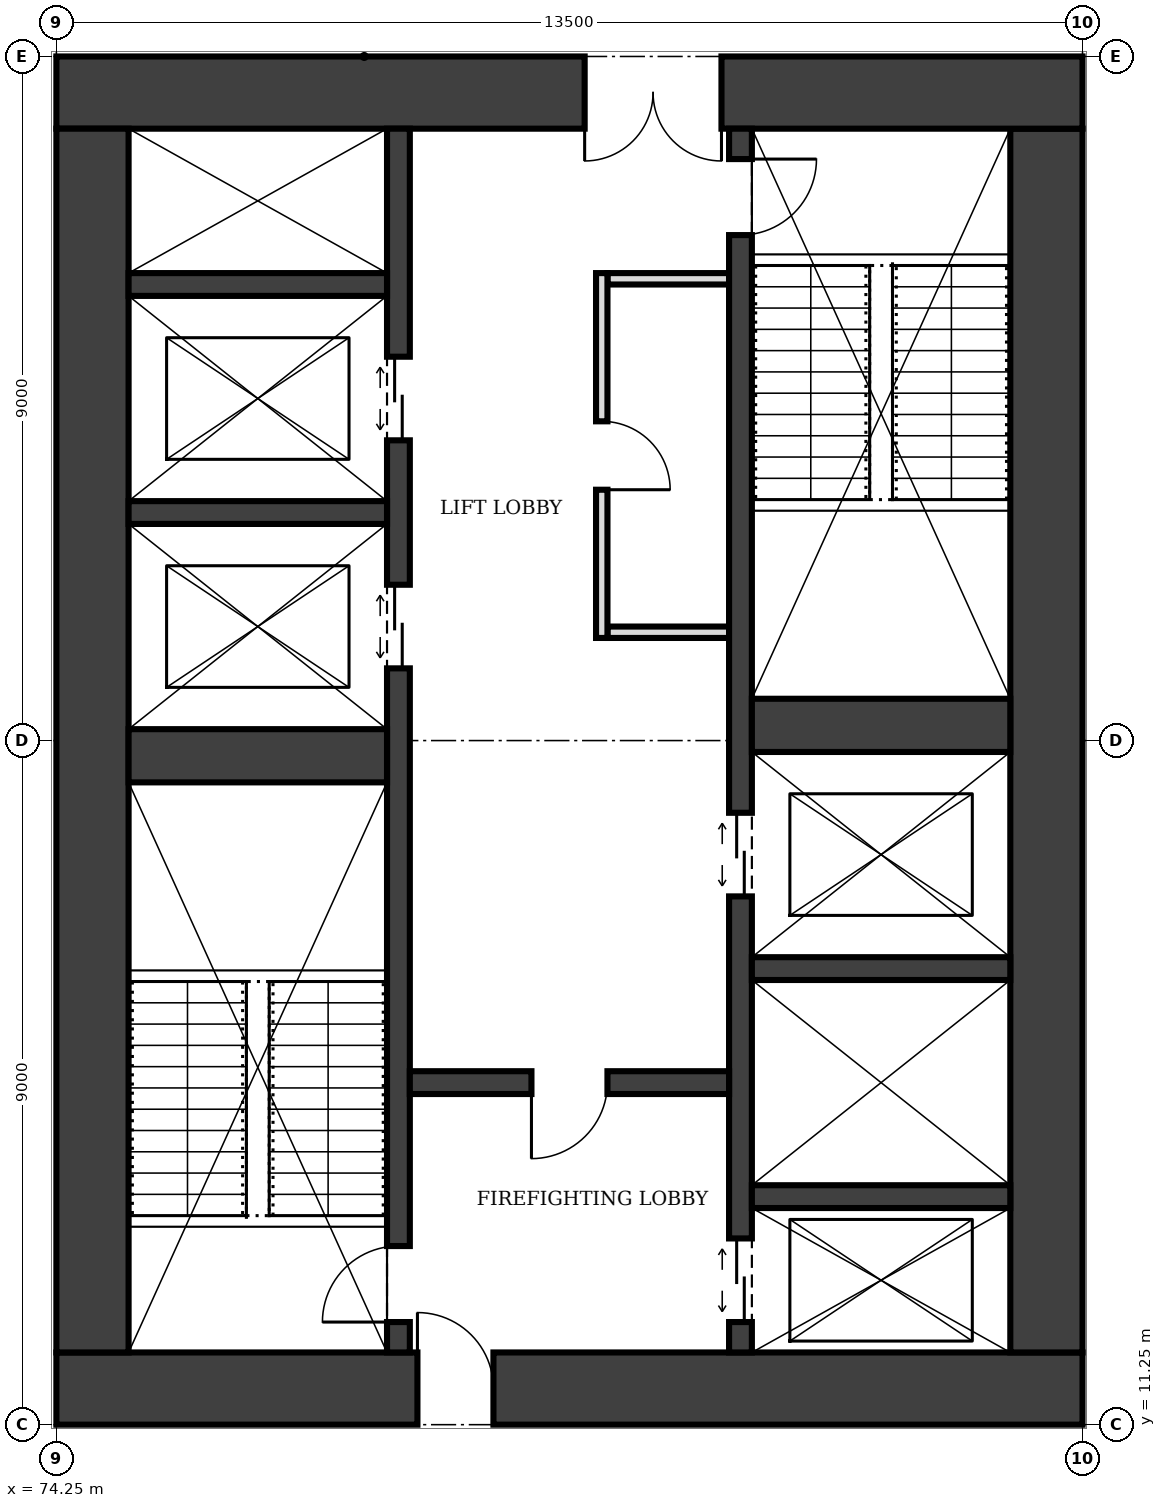
"""IFC4 building model, lengths in metres.
Left out: names, types, materials, properties, quantities, classifications, styles, units other than length and angle.
Written with IfcOpenShell. Run it as: python <this file> out.ifc"""

import sys

from ifc_helpers import new_model, si_unit, direction, frame, frame_2d, origin, place, context, subcontext, project, spatial, rectangle, extrude, element, fill, save


model = new_model("IFC4")
c1 = context("Model", 3, precision=1e-05, world=origin(), true_north=direction((0.0, 1.0)))
c2 = subcontext(c1, "Body", "Model", "MODEL_VIEW")
j1 = project(units=[si_unit("LENGTHUNIT", "METRE"), si_unit("PLANEANGLEUNIT", "RADIAN")], contexts=[c1])
p1 = place(None, origin())
s1 = spatial("IfcSite", under=j1, at=p1, CompositionType="ELEMENT")
p2 = place(p1, origin())
s2 = spatial("IfcBuilding", under=s1, at=p2, CompositionType="ELEMENT")
p3 = place(p2, frame((0.0, 0.0, 41.0)))
s3 = spatial("IfcBuildingStorey", under=s2, at=p3, CompositionType="ELEMENT", Elevation=41.0)
p4 = place(p3, frame((74.25, 11.725, 0.0), z_axis=(0.0, 0.0, 1.0), x_axis=(1.0, 0.0, 0.0)))
e1 = element("IfcWall", 1, at=p4, inside=s3, PredefinedType="SHEAR", context=c2, shape_type="SweptSolid", body=[
    extrude(rectangle(XDim=13.5, YDim=0.95, at=frame_2d((6.75, 0.0))), origin(), (0.0, 0.0, 1.0), 4.0),
])
p5 = place(p4, frame((4.75, 0.0, 0.0)))
e2 = element("IfcOpeningElement", 2, at=p5, cuts=e1, PredefinedType="OPENING", context=c2, shape_type="SweptSolid", body=[
    extrude(rectangle(XDim=1.0, YDim=2.1, at=frame_2d((0.5, 1.05))), frame((0.0, 0.485, 0.0), z_axis=(0.0, -1.0, 0.0), x_axis=(1.0, 0.0, 0.0)), (0.0, 0.0, 1.0), 0.97),
])
p6 = place(p3, frame((87.275, 12.2, 0.0), z_axis=(0.0, 0.0, 1.0), x_axis=(0.0, 1.0, 0.0)))
e3 = element("IfcWall", 3, at=p6, inside=s3, PredefinedType="SHEAR", context=c2, shape_type="SweptSolid", body=[
    extrude(rectangle(XDim=16.1, YDim=0.95, at=frame_2d((8.05, 0.0))), origin(), (0.0, 0.0, 1.0), 4.0),
])
p7 = place(p3, frame((87.75, 28.775, 0.0), z_axis=(0.0, 0.0, 1.0), x_axis=(-1.0, 0.0, 0.0)))
e4 = element("IfcWall", 4, at=p7, inside=s3, PredefinedType="SHEAR", context=c2, shape_type="SweptSolid", body=[
    extrude(rectangle(XDim=13.5, YDim=0.95, at=frame_2d((6.75, 0.0))), origin(), (0.0, 0.0, 1.0), 4.0),
])
p8 = place(p7, frame((4.75, 0.0, 0.0)))
e5 = element("IfcOpeningElement", 5, at=p8, cuts=e4, PredefinedType="OPENING", context=c2, shape_type="SweptSolid", body=[
    extrude(rectangle(XDim=1.8, YDim=2.1, at=frame_2d((0.9, 1.05))), frame((0.0, 0.485, 0.0), z_axis=(0.0, -1.0, 0.0), x_axis=(1.0, 0.0, 0.0)), (0.0, 0.0, 1.0), 0.97),
])
p9 = place(p3, frame((74.725, 28.3, 0.0), z_axis=(0.0, 0.0, 1.0), x_axis=(0.0, -1.0, 0.0)))
e6 = element("IfcWall", 6, at=p9, inside=s3, PredefinedType="SHEAR", context=c2, shape_type="SweptSolid", body=[
    extrude(rectangle(XDim=16.1, YDim=0.95, at=frame_2d((8.05, 0.0))), origin(), (0.0, 0.0, 1.0), 4.0),
])
p10 = place(p3, frame((78.75, 12.2, 0.0), z_axis=(0.0, 0.0, 1.0), x_axis=(0.0, 1.0, 0.0)))
e7 = element("IfcWall", 7, at=p10, inside=s3, PredefinedType="SHEAR", context=c2, shape_type="SweptSolid", body=[
    extrude(rectangle(XDim=16.1, YDim=0.3, at=frame_2d((8.05, 0.0))), origin(), (0.0, 0.0, 1.0), 4.0),
])
p11 = place(p10, frame((0.4, 0.0, 0.0)))
e8 = element("IfcOpeningElement", 8, at=p11, cuts=e7, PredefinedType="OPENING", context=c2, shape_type="SweptSolid", body=[
    extrude(rectangle(XDim=1.0, YDim=2.1, at=frame_2d((0.5, 1.05))), frame((0.0, 0.16, 0.0), z_axis=(0.0, -1.0, 0.0), x_axis=(1.0, 0.0, 0.0)), (0.0, 0.0, 1.0), 0.32),
])
p12 = place(p10, frame((9.0, 0.0, 0.0)))
e9 = element("IfcOpeningElement", 9, at=p12, cuts=e7, PredefinedType="OPENING", context=c2, shape_type="SweptSolid", body=[
    extrude(rectangle(XDim=1.1, YDim=2.1, at=frame_2d((0.55, 1.05))), frame((0.0, 0.16, 0.0), z_axis=(0.0, -1.0, 0.0), x_axis=(1.0, 0.0, 0.0)), (0.0, 0.0, 1.0), 0.32),
])
p13 = place(p10, frame((12.0, 0.0, 0.0)))
e10 = element("IfcOpeningElement", 10, at=p13, cuts=e7, PredefinedType="OPENING", context=c2, shape_type="SweptSolid", body=[
    extrude(rectangle(XDim=1.1, YDim=2.1, at=frame_2d((0.55, 1.05))), frame((0.0, 0.16, 0.0), z_axis=(0.0, -1.0, 0.0), x_axis=(1.0, 0.0, 0.0)), (0.0, 0.0, 1.0), 0.32),
])
p14 = place(p3, frame((83.25, 12.2, 0.0), z_axis=(0.0, 0.0, 1.0), x_axis=(0.0, 1.0, 0.0)))
e11 = element("IfcWall", 11, at=p14, inside=s3, PredefinedType="SHEAR", context=c2, shape_type="SweptSolid", body=[
    extrude(rectangle(XDim=16.1, YDim=0.3, at=frame_2d((8.05, 0.0))), origin(), (0.0, 0.0, 1.0), 4.0),
])
p15 = place(p14, frame((14.7, 0.0, 0.0)))
e12 = element("IfcOpeningElement", 12, at=p15, cuts=e11, PredefinedType="OPENING", context=c2, shape_type="SweptSolid", body=[
    extrude(rectangle(XDim=1.0, YDim=2.1, at=frame_2d((0.5, 1.05))), frame((0.0, 0.16, 0.0), z_axis=(0.0, -1.0, 0.0), x_axis=(1.0, 0.0, 0.0)), (0.0, 0.0, 1.0), 0.32),
])
p16 = place(p14, frame((0.4, 0.0, 0.0)))
e13 = element("IfcOpeningElement", 13, at=p16, cuts=e11, PredefinedType="OPENING", context=c2, shape_type="SweptSolid", body=[
    extrude(rectangle(XDim=1.1, YDim=2.1, at=frame_2d((0.55, 1.05))), frame((0.0, 0.16, 0.0), z_axis=(0.0, -1.0, 0.0), x_axis=(1.0, 0.0, 0.0)), (0.0, 0.0, 1.0), 0.32),
])
p17 = place(p14, frame((6.0, 0.0, 0.0)))
e14 = element("IfcOpeningElement", 14, at=p17, cuts=e11, PredefinedType="OPENING", context=c2, shape_type="SweptSolid", body=[
    extrude(rectangle(XDim=1.1, YDim=2.1, at=frame_2d((0.55, 1.05))), frame((0.0, 0.16, 0.0), z_axis=(0.0, -1.0, 0.0), x_axis=(1.0, 0.0, 0.0)), (0.0, 0.0, 1.0), 0.32),
])
p18 = place(p3, frame((75.2, 20.05, 0.0), z_axis=(0.0, 0.0, 1.0), x_axis=(1.0, 0.0, 0.0)))
e15 = element("IfcWall", 15, at=p18, inside=s3, PredefinedType="SHEAR", context=c2, shape_type="SweptSolid", body=[
    extrude(rectangle(XDim=3.4, YDim=0.7, at=frame_2d((1.7, 0.0))), origin(), (0.0, 0.0, 1.0), 4.0),
])
p19 = place(p3, frame((78.9, 15.75, 0.0), z_axis=(0.0, 0.0, 1.0), x_axis=(1.0, 0.0, 0.0)))
e16 = element("IfcWall", 16, at=p19, inside=s3, PredefinedType="SHEAR", context=c2, shape_type="SweptSolid", body=[
    extrude(rectangle(XDim=4.2, YDim=0.3, at=frame_2d((2.1, 0.0))), origin(), (0.0, 0.0, 1.0), 4.0),
])
p20 = place(p19, frame((1.6, 0.0, 0.0)))
e17 = element("IfcOpeningElement", 17, at=p20, cuts=e16, PredefinedType="OPENING", context=c2, shape_type="SweptSolid", body=[
    extrude(rectangle(XDim=1.0, YDim=2.1, at=frame_2d((0.5, 1.05))), frame((0.0, 0.16, 0.0), z_axis=(0.0, -1.0, 0.0), x_axis=(1.0, 0.0, 0.0)), (0.0, 0.0, 1.0), 0.32),
])
for number, where, z_axis, x_axis in (
    (18, (83.4, 14.25, 0.0), (0.0, 0.0, 1.0), (1.0, 0.0, 0.0)),
    (19, (83.4, 17.25, 0.0), (0.0, 0.0, 1.0), (1.0, 0.0, 0.0)),
):
    element("IfcWall", number, at=place(p3, frame(where, z_axis=z_axis, x_axis=x_axis)), inside=s3, PredefinedType="SHEAR", context=c2, shape_type="SweptSolid", body=[
        extrude(rectangle(XDim=3.4, YDim=0.3, at=frame_2d((1.7, 0.0))), origin(), (0.0, 0.0, 1.0), 4.0),
    ])
p21 = place(p3, frame((83.4, 20.45, 0.0), z_axis=(0.0, 0.0, 1.0), x_axis=(1.0, 0.0, 0.0)))
e20 = element("IfcWall", 20, at=p21, inside=s3, PredefinedType="SHEAR", context=c2, shape_type="SweptSolid", body=[
    extrude(rectangle(XDim=3.4, YDim=0.7, at=frame_2d((1.7, 0.0))), origin(), (0.0, 0.0, 1.0), 4.0),
])
for number, where, z_axis, x_axis in (
    (21, (75.2, 23.25, 0.0), (0.0, 0.0, 1.0), (1.0, 0.0, 0.0)),
    (22, (75.2, 26.25, 0.0), (0.0, 0.0, 1.0), (1.0, 0.0, 0.0)),
):
    element("IfcWall", number, at=place(p3, frame(where, z_axis=z_axis, x_axis=x_axis)), inside=s3, PredefinedType="SHEAR", context=c2, shape_type="SweptSolid", body=[
        extrude(rectangle(XDim=3.4, YDim=0.3, at=frame_2d((1.7, 0.0))), origin(), (0.0, 0.0, 1.0), 4.0),
    ])
p22 = place(p3, frame((81.425, 21.6, 0.0), z_axis=(0.0, 0.0, 1.0), x_axis=(0.0, 1.0, 0.0)))
e23 = element("IfcWall", 23, at=p22, inside=s3, PredefinedType="PARTITIONING", context=c2, shape_type="SweptSolid", body=[
    extrude(rectangle(XDim=4.8, YDim=0.15, at=frame_2d((2.4, 0.0))), origin(), (0.0, 0.0, 1.0), 3.75),
])
p23 = place(p22, frame((1.95, 0.0, 0.0)))
e24 = element("IfcOpeningElement", 24, at=p23, cuts=e23, PredefinedType="OPENING", context=c2, shape_type="SweptSolid", body=[
    extrude(rectangle(XDim=0.9, YDim=2.1, at=frame_2d((0.45, 1.05))), frame((0.0, 0.085, 0.0), z_axis=(0.0, -1.0, 0.0), x_axis=(1.0, 0.0, 0.0)), (0.0, 0.0, 1.0), 0.17),
])
for number, where, z_axis, x_axis in (
    (25, (81.5, 21.675, 0.0), (0.0, 0.0, 1.0), (1.0, 0.0, 0.0)),
    (26, (81.5, 26.325, 0.0), (0.0, 0.0, 1.0), (1.0, 0.0, 0.0)),
):
    element("IfcWall", number, at=place(p3, frame(where, z_axis=z_axis, x_axis=x_axis)), inside=s3, PredefinedType="PARTITIONING", context=c2, shape_type="SweptSolid", body=[
        extrude(rectangle(XDim=1.6, YDim=0.15, at=frame_2d((0.8, 0.0))), origin(), (0.0, 0.0, 1.0), 3.75),
    ])
p24 = place(p5, origin())
e27 = element("IfcDoor", 27, at=p24, inside=s3, OperationType="SINGLE_SWING_LEFT", PredefinedType="DOOR", context=c2, shape_type="SweptSolid", body=[
    extrude(rectangle(XDim=1.0, YDim=2.1, at=frame_2d((0.5, 1.05))), frame((0.0, 0.025, 0.0), z_axis=(0.0, -1.0, 0.0), x_axis=(1.0, 0.0, 0.0)), (0.0, 0.0, 1.0), 0.05),
])
fill(e2, e27)
p25 = place(p8, origin())
e28 = element("IfcDoor", 28, at=p25, inside=s3, OperationType="DOUBLE_DOOR_SINGLE_SWING", PredefinedType="DOOR", context=c2, shape_type="SweptSolid", body=[
    extrude(rectangle(XDim=1.8, YDim=2.1, at=frame_2d((0.9, 1.05))), frame((0.0, 0.025, 0.0), z_axis=(0.0, -1.0, 0.0), x_axis=(1.0, 0.0, 0.0)), (0.0, 0.0, 1.0), 0.05),
])
fill(e5, e28)
p26 = place(p20, frame((1.0, 0.0, 0.0), z_axis=(0.0, 0.0, 1.0), x_axis=(-1.0, 0.0, 0.0)))
e29 = element("IfcDoor", 29, at=p26, inside=s3, OperationType="SINGLE_SWING_RIGHT", PredefinedType="DOOR", context=c2, shape_type="SweptSolid", body=[
    extrude(rectangle(XDim=1.0, YDim=2.1, at=frame_2d((0.5, 1.05))), frame((0.0, 0.025, 0.0), z_axis=(0.0, -1.0, 0.0), x_axis=(1.0, 0.0, 0.0)), (0.0, 0.0, 1.0), 0.05),
])
fill(e17, e29)
p27 = place(p11, origin())
e30 = element("IfcDoor", 30, at=p27, inside=s3, OperationType="SINGLE_SWING_LEFT", PredefinedType="DOOR", context=c2, shape_type="SweptSolid", body=[
    extrude(rectangle(XDim=1.0, YDim=2.1, at=frame_2d((0.5, 1.05))), frame((0.0, 0.025, 0.0), z_axis=(0.0, -1.0, 0.0), x_axis=(1.0, 0.0, 0.0)), (0.0, 0.0, 1.0), 0.05),
])
fill(e8, e30)
p28 = place(p15, frame((1.0, 0.0, 0.0), z_axis=(0.0, 0.0, 1.0), x_axis=(-1.0, 0.0, 0.0)))
e31 = element("IfcDoor", 31, at=p28, inside=s3, OperationType="SINGLE_SWING_LEFT", PredefinedType="DOOR", context=c2, shape_type="SweptSolid", body=[
    extrude(rectangle(XDim=1.0, YDim=2.1, at=frame_2d((0.5, 1.05))), frame((0.0, 0.025, 0.0), z_axis=(0.0, -1.0, 0.0), x_axis=(1.0, 0.0, 0.0)), (0.0, 0.0, 1.0), 0.05),
])
fill(e12, e31)
p29 = place(p16, origin())
e32 = element("IfcDoor", 32, at=p29, inside=s3, OperationType="DOUBLE_DOOR_SLIDING", PredefinedType="DOOR", context=c2, shape_type="SweptSolid", body=[
    extrude(rectangle(XDim=1.1, YDim=2.1, at=frame_2d((0.55, 1.05))), frame((0.0, 0.025, 0.0), z_axis=(0.0, -1.0, 0.0), x_axis=(1.0, 0.0, 0.0)), (0.0, 0.0, 1.0), 0.05),
])
fill(e13, e32)
p30 = place(p12, origin())
e33 = element("IfcDoor", 33, at=p30, inside=s3, OperationType="DOUBLE_DOOR_SLIDING", PredefinedType="DOOR", context=c2, shape_type="SweptSolid", body=[
    extrude(rectangle(XDim=1.1, YDim=2.1, at=frame_2d((0.55, 1.05))), frame((0.0, 0.025, 0.0), z_axis=(0.0, -1.0, 0.0), x_axis=(1.0, 0.0, 0.0)), (0.0, 0.0, 1.0), 0.05),
])
fill(e9, e33)
p31 = place(p13, origin())
e34 = element("IfcDoor", 34, at=p31, inside=s3, OperationType="DOUBLE_DOOR_SLIDING", PredefinedType="DOOR", context=c2, shape_type="SweptSolid", body=[
    extrude(rectangle(XDim=1.1, YDim=2.1, at=frame_2d((0.55, 1.05))), frame((0.0, 0.025, 0.0), z_axis=(0.0, -1.0, 0.0), x_axis=(1.0, 0.0, 0.0)), (0.0, 0.0, 1.0), 0.05),
])
fill(e10, e34)
p32 = place(p17, origin())
e35 = element("IfcDoor", 35, at=p32, inside=s3, OperationType="DOUBLE_DOOR_SLIDING", PredefinedType="DOOR", context=c2, shape_type="SweptSolid", body=[
    extrude(rectangle(XDim=1.1, YDim=2.1, at=frame_2d((0.55, 1.05))), frame((0.0, 0.025, 0.0), z_axis=(0.0, -1.0, 0.0), x_axis=(1.0, 0.0, 0.0)), (0.0, 0.0, 1.0), 0.05),
])
fill(e14, e35)
p33 = place(p23, frame((0.9, 0.0, 0.0), z_axis=(0.0, 0.0, 1.0), x_axis=(-1.0, 0.0, 0.0)))
e36 = element("IfcDoor", 36, at=p33, inside=s3, OperationType="SINGLE_SWING_RIGHT", PredefinedType="DOOR", context=c2, shape_type="SweptSolid", body=[
    extrude(rectangle(XDim=0.9, YDim=2.1, at=frame_2d((0.45, 1.05))), frame((0.0, 0.025, 0.0), z_axis=(0.0, -1.0, 0.0), x_axis=(1.0, 0.0, 0.0)), (0.0, 0.0, 1.0), 0.05),
])
fill(e24, e36)
save(model, sys.argv[1])
